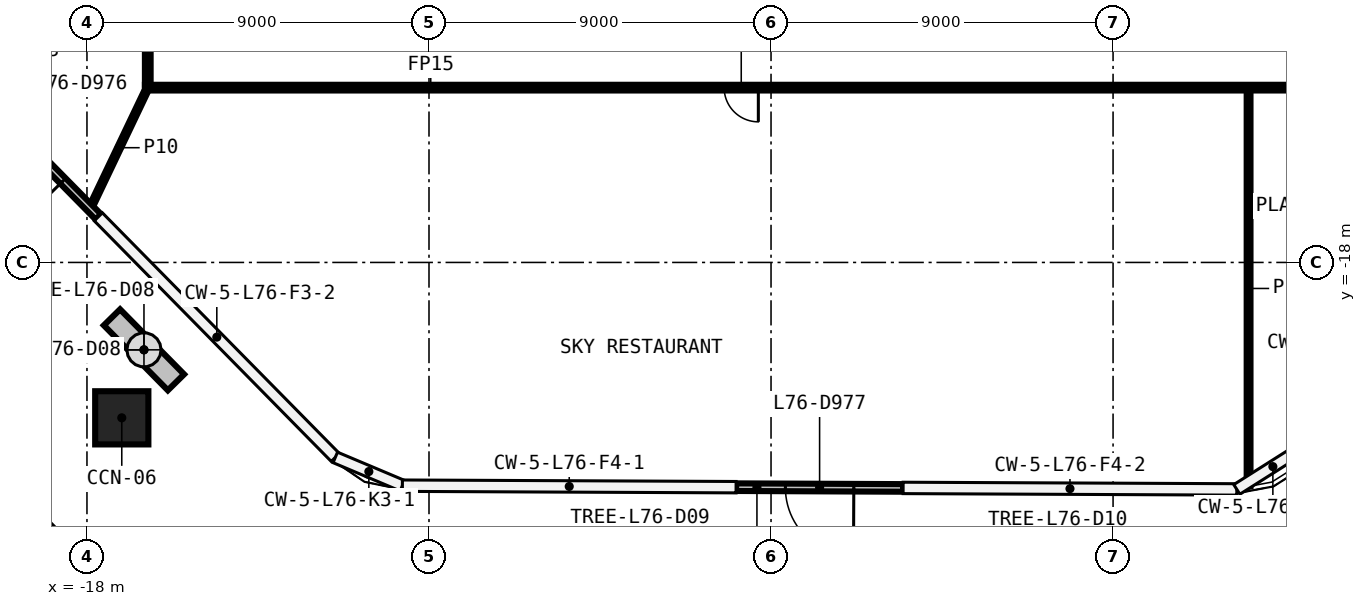
"""IFC4 building model, lengths in metres.
Left out: names, types, materials, properties, quantities, classifications, styles, units other than length and angle.
Written with IfcOpenShell. Run it as: python <this file> out.ifc"""

import sys

from ifc_helpers import new_model, si_unit, direction, frame, frame_2d, origin, origin_2d, place, context, subcontext, project, spatial, rectangle, hollow_rectangle, extrude, element, fill, save


model = new_model("IFC4")
c1 = context("Model", 3, precision=1e-05, world=origin(), true_north=direction((0.0, 1.0)))
c2 = subcontext(c1, "Body", "Model", "MODEL_VIEW")
j1 = project(units=[si_unit("LENGTHUNIT", "METRE"), si_unit("PLANEANGLEUNIT", "RADIAN")], contexts=[c1])
p1 = place(None, origin())
s1 = spatial("IfcSite", under=j1, at=p1, CompositionType="ELEMENT")
p2 = place(p1, origin())
s2 = spatial("IfcBuilding", under=s1, at=p2, CompositionType="ELEMENT")
p3 = place(p2, frame((0.0, 0.0, 353.0)))
s3 = spatial("IfcBuildingStorey", under=s2, at=p3, CompositionType="ELEMENT", Elevation=353.0)
p4 = place(p3, frame((-17.084, -22.089, 0.0), z_axis=(0.0, 0.0, 1.0), x_axis=(1.0, 0.0, 0.0)))
e1 = element("IfcColumn", 1, at=p4, inside=s3, PredefinedType="COLUMN", context=c2, shape_type="SweptSolid", body=[
    extrude(hollow_rectangle(XDim=1.4, YDim=1.4, WallThickness=0.06, at=origin_2d()), origin(), (0.0, 0.0, 1.0), 6.0),
])
p5 = place(p3, frame((16.475, -13.4, 0.0), z_axis=(0.0, 0.0, 1.0), x_axis=(-1.0, 0.0, 0.0)))
e2 = element("IfcWall", 2, at=p5, inside=s3, PredefinedType="PARTITIONING", context=c2, shape_type="SweptSolid", body=[
    extrude(rectangle(XDim=32.95, YDim=0.15, at=frame_2d((16.475, 0.0))), origin(), (0.0, 0.0, 1.0), 5.6),
])
p6 = place(p5, frame((16.809, 0.0, 0.0)))
e3 = element("IfcOpeningElement", 3, at=p6, cuts=e2, PredefinedType="OPENING", context=c2, shape_type="SweptSolid", body=[
    extrude(rectangle(XDim=0.9, YDim=2.1, at=frame_2d((0.45, 1.05))), frame((0.0, 0.085, 0.0), z_axis=(0.0, -1.0, 0.0), x_axis=(1.0, 0.0, 0.0)), (0.0, 0.0, 1.0), 0.17),
])
p7 = place(p5, frame((1.542, 0.0, 0.0)))
e4 = element("IfcOpeningElement", 4, at=p7, cuts=e2, PredefinedType="OPENING", context=c2, shape_type="SweptSolid", body=[
    extrude(rectangle(XDim=0.9, YDim=2.1, at=frame_2d((0.45, 1.05))), frame((0.0, 0.085, 0.0), z_axis=(0.0, -1.0, 0.0), x_axis=(1.0, 0.0, 0.0)), (0.0, 0.0, 1.0), 0.17),
])
p8 = place(p3, frame((-17.908, -16.561, 0.0), z_axis=(0.0, 0.0, 1.0), x_axis=(0.430658615436, 0.902514906775, 0.0)))
e5 = element("IfcWall", 5, at=p8, inside=s3, PredefinedType="PARTITIONING", context=c2, shape_type="SweptSolid", body=[
    extrude(rectangle(XDim=3.502, YDim=0.1, at=frame_2d((1.751, 0.0))), origin(), (0.0, 0.0, 1.0), 5.6),
])
p9 = place(p3, frame((12.566, -23.895, 0.0), z_axis=(0.0, 0.0, 1.0), x_axis=(0.0, 1.0, 0.0)))
e6 = element("IfcWall", 6, at=p9, inside=s3, PredefinedType="PARTITIONING", context=c2, shape_type="SweptSolid", body=[
    extrude(rectangle(XDim=10.419, YDim=0.1, at=frame_2d((5.21, 0.0))), origin(), (0.0, 0.0, 1.0), 5.6),
])
p10 = place(p3, frame((-16.4, -13.325, 0.0), z_axis=(0.0, 0.0, 1.0), x_axis=(0.0, 1.0, 0.0)))
e7 = element("IfcWall", 7, at=p10, inside=s3, PredefinedType="PARTITIONING", context=c2, shape_type="SweptSolid", body=[
    extrude(rectangle(XDim=26.65, YDim=0.15, at=frame_2d((13.325, 0.0))), origin(), (0.0, 0.0, 1.0), 5.6),
])
p11 = place(p10, frame((6.664, 0.0, 0.0)))
e8 = element("IfcOpeningElement", 8, at=p11, cuts=e7, PredefinedType="OPENING", context=c2, shape_type="SweptSolid", body=[
    extrude(rectangle(XDim=0.9, YDim=2.1, at=frame_2d((0.45, 1.05))), frame((0.0, 0.085, 0.0), z_axis=(0.0, -1.0, 0.0), x_axis=(1.0, 0.0, 0.0)), (0.0, 0.0, 1.0), 0.17),
])
p12 = place(p10, frame((20.063, 0.0, 0.0)))
e9 = element("IfcOpeningElement", 9, at=p12, cuts=e7, PredefinedType="OPENING", context=c2, shape_type="SweptSolid", body=[
    extrude(rectangle(XDim=0.9, YDim=2.1, at=frame_2d((0.45, 1.05))), frame((0.0, 0.085, 0.0), z_axis=(0.0, -1.0, 0.0), x_axis=(1.0, 0.0, 0.0)), (0.0, 0.0, 1.0), 0.17),
])
p13 = place(p3, frame((-17.701, -16.8, 0.0), z_axis=(0.0, 0.0, 1.0), x_axis=(-0.701707571783, 0.712465075426, 0.0)))
e10 = element("IfcWall", 10, at=p13, inside=s3, PredefinedType="SOLIDWALL", context=c2, shape_type="SweptSolid", body=[
    extrude(rectangle(XDim=4.448, YDim=0.2, at=frame_2d((2.224, 0.0))), origin(), (0.0, 0.0, 1.0), 5.6),
])
p14 = place(p13, frame((1.324, 0.0, 0.0)))
e11 = element("IfcOpeningElement", 11, at=p14, cuts=e10, PredefinedType="OPENING", context=c2, shape_type="SweptSolid", body=[
    extrude(rectangle(XDim=1.8, YDim=2.4, at=frame_2d((0.9, 1.2))), frame((0.0, 0.11, 0.0), z_axis=(0.0, -1.0, 0.0), x_axis=(1.0, 0.0, 0.0)), (0.0, 0.0, 1.0), 0.22),
])
p15 = place(p3, frame((3.476, -23.934, 0.0), z_axis=(0.0, 0.0, 1.0), x_axis=(-0.999990126894, 0.004443659954, 0.0)))
e12 = element("IfcWall", 12, at=p15, inside=s3, PredefinedType="SOLIDWALL", context=c2, shape_type="SweptSolid", body=[
    extrude(rectangle(XDim=4.395, YDim=0.2, at=frame_2d((2.198, 0.0))), origin(), (0.0, 0.0, 1.0), 5.6),
])
p16 = place(p15, frame((1.298, 0.0, 0.0)))
e13 = element("IfcOpeningElement", 13, at=p16, cuts=e12, PredefinedType="OPENING", context=c2, shape_type="SweptSolid", body=[
    extrude(rectangle(XDim=1.8, YDim=2.4, at=frame_2d((0.9, 1.2))), frame((0.0, 0.11, 0.0), z_axis=(0.0, -1.0, 0.0), x_axis=(1.0, 0.0, 0.0)), (0.0, 0.0, 1.0), 0.22),
])
p17 = place(p3, frame((-17.342, -19.445, 0.0), z_axis=(0.0, 0.0, 1.0), x_axis=(0.701694834722, -0.712477619947, 0.0)))
e14 = element("IfcWall", 14, at=p17, inside=s3, PredefinedType="SOLIDWALL", context=c2, shape_type="SweptSolid", body=[
    extrude(rectangle(XDim=2.4, YDim=0.6, at=frame_2d((1.2, 0.0))), origin(), (0.0, 0.0, 1.0), 0.42),
])
p18 = place(p6, origin())
e15 = element("IfcDoor", 15, at=p18, inside=s3, OperationType="SINGLE_SWING_LEFT", PredefinedType="DOOR", context=c2, shape_type="SweptSolid", body=[
    extrude(rectangle(XDim=0.9, YDim=2.1, at=frame_2d((0.45, 1.05))), frame((0.0, 0.025, 0.0), z_axis=(0.0, -1.0, 0.0), x_axis=(1.0, 0.0, 0.0)), (0.0, 0.0, 1.0), 0.05),
])
fill(e3, e15)
p19 = place(p14, origin())
e16 = element("IfcDoor", 16, at=p19, inside=s3, OperationType="SINGLE_SWING_LEFT", PredefinedType="DOOR", context=c2, shape_type="SweptSolid", body=[
    extrude(rectangle(XDim=1.8, YDim=2.4, at=frame_2d((0.9, 1.2))), frame((0.0, 0.025, 0.0), z_axis=(0.0, -1.0, 0.0), x_axis=(1.0, 0.0, 0.0)), (0.0, 0.0, 1.0), 0.05),
])
fill(e11, e16)
p20 = place(p16, origin())
e17 = element("IfcDoor", 17, at=p20, inside=s3, OperationType="SINGLE_SWING_LEFT", PredefinedType="DOOR", context=c2, shape_type="SweptSolid", body=[
    extrude(rectangle(XDim=1.8, YDim=2.4, at=frame_2d((0.9, 1.2))), frame((0.0, 0.025, 0.0), z_axis=(0.0, -1.0, 0.0), x_axis=(1.0, 0.0, 0.0)), (0.0, 0.0, 1.0), 0.05),
])
fill(e13, e17)
save(model, sys.argv[1])
